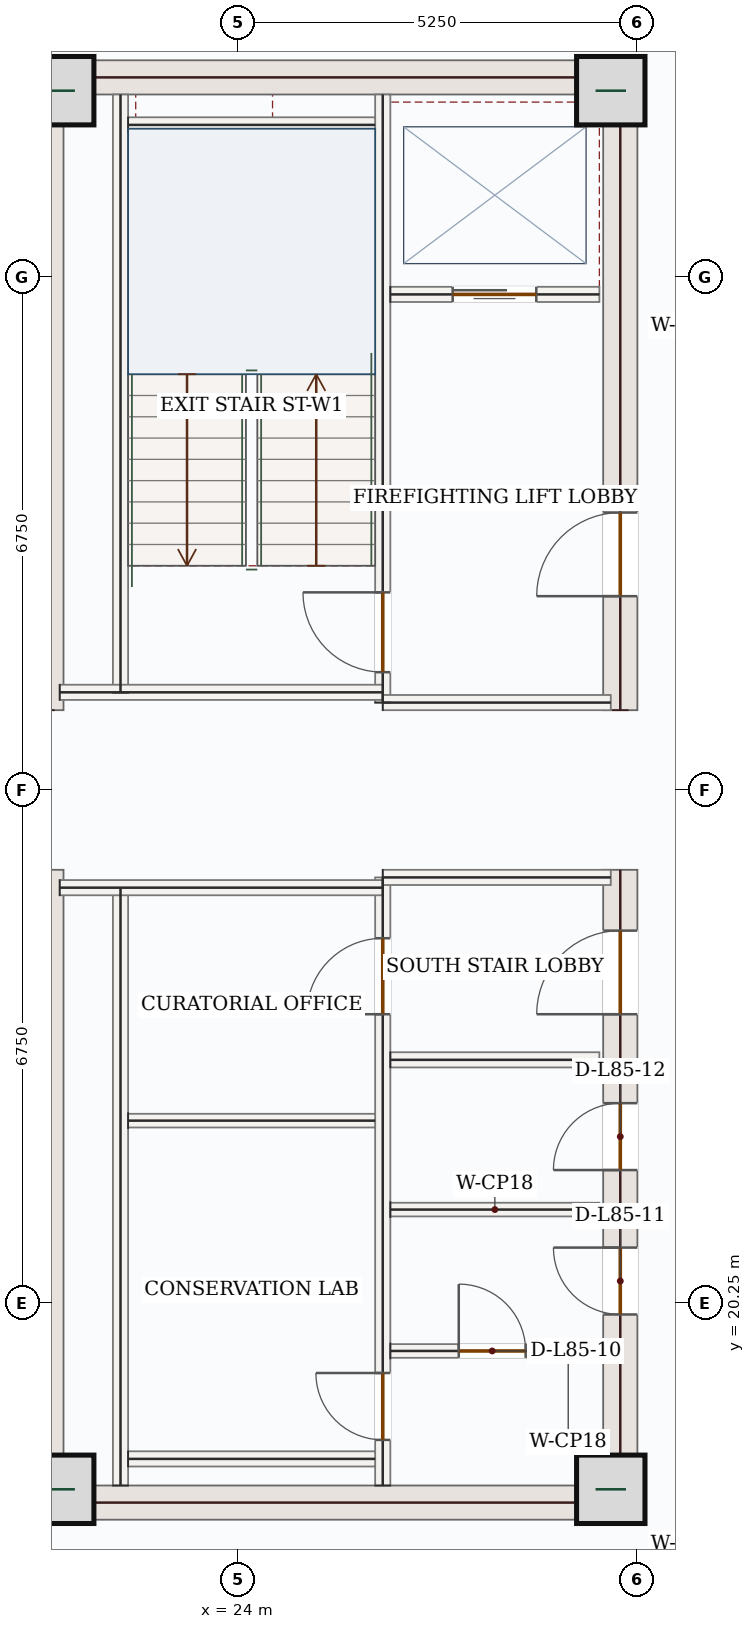
"""IFC4 building model, lengths in metres.
Left out: names, types, materials, properties, quantities, classifications, styles, units other than length and angle.
Written with IfcOpenShell. Run it as: python <this file> out.ifc"""

import sys

from ifc_helpers import new_model, si_unit, direction, frame, frame_2d, origin, origin_2d, place, context, subcontext, project, spatial, rectangle, extrude, source, transform, mapped, element, fill, save


model = new_model("IFC4")
c1 = context("Model", 3, precision=1e-05, world=origin(), true_north=direction((0.0, 1.0)))
c2 = subcontext(c1, "Body", "Model", "MODEL_VIEW")
j1 = project(units=[si_unit("LENGTHUNIT", "METRE"), si_unit("PLANEANGLEUNIT", "RADIAN")], contexts=[c1])
p1 = place(None, origin())
s1 = spatial("IfcSite", under=j1, at=p1, CompositionType="ELEMENT")
p2 = place(p1, origin())
s2 = spatial("IfcBuilding", under=s1, at=p2, CompositionType="ELEMENT")
p3 = place(p2, frame((0.0, 0.0, 349.8)))
s3 = spatial("IfcBuildingStorey", under=s2, at=p3, CompositionType="ELEMENT", Elevation=349.8)
m1 = source(origin(), c2, "Body", "SweptSolid", [
    extrude(rectangle(XDim=8.55, YDim=0.45, at=frame_2d((4.275, 0.0))), origin(), (0.0, 0.0, 1.0), 3.5),
])
for number, where, z_axis, x_axis in (
    (1, (21.475, 17.4, 0.0), (0.0, 0.0, 1.0), (0.0, 1.0, 0.0)),
    (2, (21.475, 28.05, 0.0), (0.0, 0.0, 1.0), (0.0, 1.0, 0.0)),
):
    element("IfcWall", number, at=place(p3, frame(where, z_axis=z_axis, x_axis=x_axis)), inside=s3, PredefinedType="SHEAR", context=c2, shape_type="MappedRepresentation", body=[
        mapped(m1, transform((0.0, 0.0, 0.0), x_axis=(1.0, 0.0, 0.0), y_axis=(0.0, 1.0, 0.0), z_axis=(0.0, 0.0, 1.0), scale=1.0)),
    ])
p4 = place(p3, frame((29.025, 17.4, 0.0), z_axis=(0.0, 0.0, 1.0), x_axis=(0.0, 1.0, 0.0)))
e3 = element("IfcWall", 3, at=p4, inside=s3, PredefinedType="SHEAR", context=c2, shape_type="SweptSolid", body=[
    extrude(rectangle(XDim=8.55, YDim=0.45, at=frame_2d((4.275, 0.0))), origin(), (0.0, 0.0, 1.0), 3.5),
])
p5 = place(p4, frame((6.65, 0.0, 0.0)))
e4 = element("IfcOpeningElement", 4, at=p5, cuts=e3, PredefinedType="OPENING", context=c2, shape_type="SweptSolid", body=[
    extrude(rectangle(XDim=1.1, YDim=2.2, at=frame_2d((0.55, 1.1))), frame((0.0, 0.235, 0.0), z_axis=(0.0, -1.0, 0.0), x_axis=(1.0, 0.0, 0.0)), (0.0, 0.0, 1.0), 0.47),
])
p6 = place(p4, frame((2.7, 0.0, 0.0)))
e5 = element("IfcOpeningElement", 5, at=p6, cuts=e3, PredefinedType="OPENING", context=c2, shape_type="SweptSolid", body=[
    extrude(rectangle(XDim=0.88, YDim=2.1, at=frame_2d((0.44, 1.05))), frame((0.0, 0.235, 0.0), z_axis=(0.0, -1.0, 0.0), x_axis=(1.0, 0.0, 0.0)), (0.0, 0.0, 1.0), 0.47),
])
p7 = place(p4, frame((4.6, 0.0, 0.0)))
e6 = element("IfcOpeningElement", 6, at=p7, cuts=e3, PredefinedType="OPENING", context=c2, shape_type="SweptSolid", body=[
    extrude(rectangle(XDim=0.88, YDim=2.1, at=frame_2d((0.44, 1.05))), frame((0.0, 0.235, 0.0), z_axis=(0.0, -1.0, 0.0), x_axis=(1.0, 0.0, 0.0)), (0.0, 0.0, 1.0), 0.47),
])
p8 = place(p3, frame((29.025, 28.05, 0.0), z_axis=(0.0, 0.0, 1.0), x_axis=(0.0, 1.0, 0.0)))
e7 = element("IfcWall", 7, at=p8, inside=s3, PredefinedType="SHEAR", context=c2, shape_type="SweptSolid", body=[
    extrude(rectangle(XDim=8.55, YDim=0.45, at=frame_2d((4.275, 0.0))), origin(), (0.0, 0.0, 1.0), 3.5),
])
p9 = place(p8, frame((1.5, 0.0, 0.0)))
e8 = element("IfcOpeningElement", 8, at=p9, cuts=e7, PredefinedType="OPENING", context=c2, shape_type="SweptSolid", body=[
    extrude(rectangle(XDim=1.1, YDim=2.2, at=frame_2d((0.55, 1.1))), frame((0.0, 0.235, 0.0), z_axis=(0.0, -1.0, 0.0), x_axis=(1.0, 0.0, 0.0)), (0.0, 0.0, 1.0), 0.47),
])
m2 = source(origin(), c2, "Body", "SweptSolid", [
    extrude(rectangle(XDim=7.1, YDim=0.45, at=frame_2d((3.55, 0.0))), origin(), (0.0, 0.0, 1.0), 3.5),
])
for number, where, z_axis, x_axis in (
    (9, (21.7, 17.625, 0.0), (0.0, 0.0, 1.0), (1.0, 0.0, 0.0)),
    (10, (21.7, 36.375, 0.0), (0.0, 0.0, 1.0), (1.0, 0.0, 0.0)),
):
    element("IfcWall", number, at=place(p3, frame(where, z_axis=z_axis, x_axis=x_axis)), inside=s3, PredefinedType="SHEAR", context=c2, shape_type="MappedRepresentation", body=[
        mapped(m2, transform((0.0, 0.0, 0.0), x_axis=(1.0, 0.0, 0.0), y_axis=(0.0, 1.0, 0.0), z_axis=(0.0, 0.0, 1.0), scale=1.0)),
    ])
m3 = source(origin(), c2, "Body", "SweptSolid", [
    extrude(rectangle(XDim=0.9, YDim=0.9, at=origin_2d()), origin(), (0.0, 0.0, 1.0), 3.75),
])
for number, where, z_axis, x_axis in (
    (11, (21.65, 17.8, 0.0), (0.0, 0.0, 1.0), (1.0, 0.0, 0.0)),
    (12, (28.9, 17.8, 0.0), (0.0, 0.0, 1.0), (1.0, 0.0, 0.0)),
    (13, (21.65, 36.2, 0.0), (0.0, 0.0, 1.0), (1.0, 0.0, 0.0)),
    (14, (28.9, 36.2, 0.0), (0.0, 0.0, 1.0), (1.0, 0.0, 0.0)),
):
    element("IfcColumn", number, at=place(p3, frame(where, z_axis=z_axis, x_axis=x_axis)), inside=s3, PredefinedType="COLUMN", context=c2, shape_type="MappedRepresentation", body=[
        mapped(m3, transform((0.0, 0.0, 0.0), x_axis=(1.0, 0.0, 0.0), y_axis=(0.0, 1.0, 0.0), z_axis=(0.0, 0.0, 1.0), scale=1.0)),
    ])
p10 = place(p3, frame((22.167, 14.994, 0.0), z_axis=(0.0, 0.0, 1.0), x_axis=(-0.681733754317, 0.731600361006, 0.0)))
e15 = element("IfcWall", 15, at=p10, inside=s3, PredefinedType="SOLIDWALL", context=c2, shape_type="SweptSolid", body=[
    extrude(rectangle(XDim=4.734, YDim=0.28, at=frame_2d((2.367, 0.0))), origin(), (0.0, 0.0, 1.0), 3.5),
])
p11 = place(p10, frame((1.617, 0.0, 0.85)))
e16 = element("IfcOpeningElement", 16, at=p11, cuts=e15, PredefinedType="OPENING", context=c2, shape_type="SweptSolid", body=[
    extrude(rectangle(XDim=1.5, YDim=1.5, at=frame_2d((0.75, 0.75))), frame((0.0, 0.15, 0.0), z_axis=(0.0, -1.0, 0.0), x_axis=(1.0, 0.0, 0.0)), (0.0, 0.0, 1.0), 0.3),
])
m4 = source(origin(), c2, "Body", "SweptSolid", [
    extrude(rectangle(XDim=7.87, YDim=0.2, at=frame_2d((3.935, 0.0))), origin(), (0.0, 0.0, 1.0), 3.5),
])
for number, where, z_axis, x_axis in (
    (17, (22.45, 17.85, 0.0), (0.0, 0.0, 1.0), (0.0, 1.0, 0.0)),
    (18, (22.45, 28.28, 0.0), (0.0, 0.0, 1.0), (0.0, 1.0, 0.0)),
):
    element("IfcWall", number, at=place(p3, frame(where, z_axis=z_axis, x_axis=x_axis)), inside=s3, PredefinedType="SOLIDWALL", context=c2, shape_type="MappedRepresentation", body=[
        mapped(m4, transform((0.0, 0.0, 0.0), x_axis=(1.0, 0.0, 0.0), y_axis=(0.0, 1.0, 0.0), z_axis=(0.0, 0.0, 1.0), scale=1.0)),
    ])
p12 = place(p3, frame((25.9, 17.85, 0.0), z_axis=(0.0, 0.0, 1.0), x_axis=(0.0, 1.0, 0.0)))
e19 = element("IfcWall", 19, at=p12, inside=s3, PredefinedType="SOLIDWALL", context=c2, shape_type="SweptSolid", body=[
    extrude(rectangle(XDim=8.0, YDim=0.2, at=frame_2d((4.0, 0.0))), origin(), (0.0, 0.0, 1.0), 3.5),
])
p13 = place(p12, frame((6.2, 0.0, 0.0)))
e20 = element("IfcOpeningElement", 20, at=p13, cuts=e19, PredefinedType="OPENING", context=c2, shape_type="SweptSolid", body=[
    extrude(rectangle(XDim=1.0, YDim=2.15, at=frame_2d((0.5, 1.075))), frame((0.0, 0.11, 0.0), z_axis=(0.0, -1.0, 0.0), x_axis=(1.0, 0.0, 0.0)), (0.0, 0.0, 1.0), 0.22),
])
p14 = place(p12, frame((0.6, 0.0, 0.0)))
e21 = element("IfcOpeningElement", 21, at=p14, cuts=e19, PredefinedType="OPENING", context=c2, shape_type="SweptSolid", body=[
    extrude(rectangle(XDim=0.88, YDim=2.1, at=frame_2d((0.44, 1.05))), frame((0.0, 0.11, 0.0), z_axis=(0.0, -1.0, 0.0), x_axis=(1.0, 0.0, 0.0)), (0.0, 0.0, 1.0), 0.22),
])
p15 = place(p3, frame((25.9, 28.15, 0.0), z_axis=(0.0, 0.0, 1.0), x_axis=(0.0, 1.0, 0.0)))
e22 = element("IfcWall", 22, at=p15, inside=s3, PredefinedType="SOLIDWALL", context=c2, shape_type="SweptSolid", body=[
    extrude(rectangle(XDim=8.0, YDim=0.2, at=frame_2d((4.0, 0.0))), origin(), (0.0, 0.0, 1.0), 3.5),
])
p16 = place(p15, frame((0.4, 0.0, 0.0)))
e23 = element("IfcOpeningElement", 23, at=p16, cuts=e22, PredefinedType="OPENING", context=c2, shape_type="SweptSolid", body=[
    extrude(rectangle(XDim=1.05, YDim=2.15, at=frame_2d((0.525, 1.075))), frame((0.0, 0.11, 0.0), z_axis=(0.0, -1.0, 0.0), x_axis=(1.0, 0.0, 0.0)), (0.0, 0.0, 1.0), 0.22),
])
m5 = source(origin(), c2, "Body", "SweptSolid", [
    extrude(rectangle(XDim=4.25, YDim=0.2, at=frame_2d((2.125, 0.0))), origin(), (0.0, 0.0, 1.0), 3.5),
])
p17 = place(p3, frame((21.65, 25.715, 0.0), z_axis=(0.0, 0.0, 1.0), x_axis=(1.0, 0.0, 0.0)))
e24 = element("IfcWall", 24, at=p17, inside=s3, PredefinedType="SOLIDWALL", context=c2, shape_type="MappedRepresentation", body=[
    mapped(m5, transform((0.0, 0.0, 0.0), x_axis=(1.0, 0.0, 0.0), y_axis=(0.0, 1.0, 0.0), z_axis=(0.0, 0.0, 1.0), scale=1.0)),
])
m6 = source(origin(), c2, "Body", "SweptSolid", [
    extrude(rectangle(XDim=3.0, YDim=0.2, at=frame_2d((1.5, 0.0))), origin(), (0.0, 0.0, 1.0), 3.5),
])
p18 = place(p3, frame((25.9, 25.85, 0.0), z_axis=(0.0, 0.0, 1.0), x_axis=(1.0, 0.0, 0.0)))
e25 = element("IfcWall", 25, at=p18, inside=s3, PredefinedType="SOLIDWALL", context=c2, shape_type="MappedRepresentation", body=[
    mapped(m6, transform((0.0, 0.0, 0.0), x_axis=(1.0, 0.0, 0.0), y_axis=(0.0, 1.0, 0.0), z_axis=(0.0, 0.0, 1.0), scale=1.0)),
])
p19 = place(p3, frame((21.65, 28.285, 0.0), z_axis=(0.0, 0.0, 1.0), x_axis=(1.0, 0.0, 0.0)))
e26 = element("IfcWall", 26, at=p19, inside=s3, PredefinedType="SOLIDWALL", context=c2, shape_type="MappedRepresentation", body=[
    mapped(m5, transform((0.0, 0.0, 0.0), x_axis=(1.0, 0.0, 0.0), y_axis=(0.0, 1.0, 0.0), z_axis=(0.0, 0.0, 1.0), scale=1.0)),
])
p20 = place(p3, frame((25.9, 28.15, 0.0), z_axis=(0.0, 0.0, 1.0), x_axis=(1.0, 0.0, 0.0)))
e27 = element("IfcWall", 27, at=p20, inside=s3, PredefinedType="SOLIDWALL", context=c2, shape_type="MappedRepresentation", body=[
    mapped(m6, transform((0.0, 0.0, 0.0), x_axis=(1.0, 0.0, 0.0), y_axis=(0.0, 1.0, 0.0), z_axis=(0.0, 0.0, 1.0), scale=1.0)),
])
m7 = source(origin(), c2, "Body", "SweptSolid", [
    extrude(rectangle(XDim=3.25, YDim=0.2, at=frame_2d((1.625, 0.0))), origin(), (0.0, 0.0, 1.0), 3.5),
])
for number, where, z_axis, x_axis in (
    (28, (22.55, 35.75, 0.0), (0.0, 0.0, 1.0), (1.0, 0.0, 0.0)),
    (29, (22.55, 18.2, 0.0), (0.0, 0.0, 1.0), (1.0, 0.0, 0.0)),
):
    element("IfcWall", number, at=place(p3, frame(where, z_axis=z_axis, x_axis=x_axis)), inside=s3, PredefinedType="SOLIDWALL", context=c2, shape_type="MappedRepresentation", body=[
        mapped(m7, transform((0.0, 0.0, 0.0), x_axis=(1.0, 0.0, 0.0), y_axis=(0.0, 1.0, 0.0), z_axis=(0.0, 0.0, 1.0), scale=1.0)),
    ])
m8 = source(origin(), c2, "Body", "SweptSolid", [
    extrude(rectangle(XDim=3.25, YDim=0.18, at=frame_2d((1.625, 0.0))), origin(), (0.0, 0.0, 1.0), 3.5),
])
p21 = place(p3, frame((22.55, 22.65, 0.0), z_axis=(0.0, 0.0, 1.0), x_axis=(1.0, 0.0, 0.0)))
e30 = element("IfcWall", 30, at=p21, inside=s3, PredefinedType="PARTITIONING", context=c2, shape_type="MappedRepresentation", body=[
    mapped(m8, transform((0.0, 0.0, 0.0), x_axis=(1.0, 0.0, 0.0), y_axis=(0.0, 1.0, 0.0), z_axis=(0.0, 0.0, 1.0), scale=1.0)),
])
p22 = place(p3, frame((26.0, 33.52, 0.0), z_axis=(0.0, 0.0, 1.0), x_axis=(1.0, 0.0, 0.0)))
e31 = element("IfcWall", 31, at=p22, inside=s3, PredefinedType="SOLIDWALL", context=c2, shape_type="SweptSolid", body=[
    extrude(rectangle(XDim=2.75, YDim=0.2, at=frame_2d((1.375, 0.0))), origin(), (0.0, 0.0, 1.0), 3.5),
])
p23 = place(p22, frame((0.82, 0.0, 0.0)))
e32 = element("IfcOpeningElement", 32, at=p23, cuts=e31, PredefinedType="OPENING", context=c2, shape_type="SweptSolid", body=[
    extrude(rectangle(XDim=1.1, YDim=2.15, at=frame_2d((0.55, 1.075))), frame((0.0, 0.11, 0.0), z_axis=(0.0, -1.0, 0.0), x_axis=(1.0, 0.0, 0.0)), (0.0, 0.0, 1.0), 0.22),
])
m9 = source(origin(), c2, "Body", "SweptSolid", [
    extrude(rectangle(XDim=2.75, YDim=0.2, at=frame_2d((1.375, 0.0))), origin(), (0.0, 0.0, 1.0), 3.5),
])
p24 = place(p3, frame((26.0, 23.45, 0.0), z_axis=(0.0, 0.0, 1.0), x_axis=(1.0, 0.0, 0.0)))
e33 = element("IfcWall", 33, at=p24, inside=s3, PredefinedType="SOLIDWALL", context=c2, shape_type="MappedRepresentation", body=[
    mapped(m9, transform((0.0, 0.0, 0.0), x_axis=(1.0, 0.0, 0.0), y_axis=(0.0, 1.0, 0.0), z_axis=(0.0, 0.0, 1.0), scale=1.0)),
])
p25 = place(p3, frame((26.0, 19.62, 0.0), z_axis=(0.0, 0.0, 1.0), x_axis=(1.0, 0.0, 0.0)))
e34 = element("IfcWall", 34, at=p25, inside=s3, PredefinedType="PARTITIONING", context=c2, shape_type="SweptSolid", body=[
    extrude(rectangle(XDim=2.75, YDim=0.18, at=frame_2d((1.375, 0.0))), origin(), (0.0, 0.0, 1.0), 3.5),
])
p26 = place(p25, frame((0.9, 0.0, 0.0)))
e35 = element("IfcOpeningElement", 35, at=p26, cuts=e34, PredefinedType="OPENING", context=c2, shape_type="SweptSolid", body=[
    extrude(rectangle(XDim=0.88, YDim=2.1, at=frame_2d((0.44, 1.05))), frame((0.0, 0.1, 0.0), z_axis=(0.0, -1.0, 0.0), x_axis=(1.0, 0.0, 0.0)), (0.0, 0.0, 1.0), 0.2),
])
m10 = source(origin(), c2, "Body", "SweptSolid", [
    extrude(rectangle(XDim=2.75, YDim=0.18, at=frame_2d((1.375, 0.0))), origin(), (0.0, 0.0, 1.0), 3.5),
])
p27 = place(p3, frame((26.0, 21.48, 0.0), z_axis=(0.0, 0.0, 1.0), x_axis=(1.0, 0.0, 0.0)))
e36 = element("IfcWall", 36, at=p27, inside=s3, PredefinedType="PARTITIONING", context=c2, shape_type="MappedRepresentation", body=[
    mapped(m10, transform((0.0, 0.0, 0.0), x_axis=(1.0, 0.0, 0.0), y_axis=(0.0, 1.0, 0.0), z_axis=(0.0, 0.0, 1.0), scale=1.0)),
])
m11 = source(origin(), c2, "Body", "SweptSolid", [
    extrude(rectangle(XDim=1.05, YDim=2.15, at=frame_2d((0.525, 1.075))), frame((0.0, 0.025, 0.0), z_axis=(0.0, -1.0, 0.0), x_axis=(1.0, 0.0, 0.0)), (0.0, 0.0, 1.0), 0.05),
])
p28 = place(p16, origin())
e37 = element("IfcDoor", 37, at=p28, inside=s3, OperationType="SINGLE_SWING_RIGHT", PredefinedType="DOOR", context=c2, shape_type="MappedRepresentation", body=[
    mapped(m11, transform((0.0, 0.0, 0.0), x_axis=(1.0, 0.0, 0.0), y_axis=(0.0, 1.0, 0.0), z_axis=(0.0, 0.0, 1.0), scale=1.0)),
])
fill(e23, e37)
m12 = source(origin(), c2, "Body", "SweptSolid", [
    extrude(rectangle(XDim=1.0, YDim=2.15, at=frame_2d((0.5, 1.075))), frame((0.0, 0.025, 0.0), z_axis=(0.0, -1.0, 0.0), x_axis=(1.0, 0.0, 0.0)), (0.0, 0.0, 1.0), 0.05),
])
p29 = place(p13, origin())
e38 = element("IfcDoor", 38, at=p29, inside=s3, OperationType="SINGLE_SWING_LEFT", PredefinedType="DOOR", context=c2, shape_type="MappedRepresentation", body=[
    mapped(m12, transform((0.0, 0.0, 0.0), x_axis=(1.0, 0.0, 0.0), y_axis=(0.0, 1.0, 0.0), z_axis=(0.0, 0.0, 1.0), scale=1.0)),
])
fill(e20, e38)
m13 = source(origin(), c2, "Body", "SweptSolid", [
    extrude(rectangle(XDim=0.88, YDim=2.1, at=frame_2d((0.44, 1.05))), frame((0.0, 0.025, 0.0), z_axis=(0.0, -1.0, 0.0), x_axis=(1.0, 0.0, 0.0)), (0.0, 0.0, 1.0), 0.05),
])
p30 = place(p14, origin())
e39 = element("IfcDoor", 39, at=p30, inside=s3, OperationType="SINGLE_SWING_RIGHT", PredefinedType="DOOR", context=c2, shape_type="MappedRepresentation", body=[
    mapped(m13, transform((0.0, 0.0, 0.0), x_axis=(1.0, 0.0, 0.0), y_axis=(0.0, 1.0, 0.0), z_axis=(0.0, 0.0, 1.0), scale=1.0)),
])
fill(e21, e39)
m14 = source(origin(), c2, "Body", "SweptSolid", [
    extrude(rectangle(XDim=1.1, YDim=2.15, at=frame_2d((0.55, 1.075))), frame((0.0, 0.025, 0.0), z_axis=(0.0, -1.0, 0.0), x_axis=(1.0, 0.0, 0.0)), (0.0, 0.0, 1.0), 0.05),
])
p31 = place(p23, origin())
e40 = element("IfcDoor", 40, at=p31, inside=s3, OperationType="DOUBLE_DOOR_SLIDING", PredefinedType="DOOR", context=c2, shape_type="MappedRepresentation", body=[
    mapped(m14, transform((0.0, 0.0, 0.0), x_axis=(1.0, 0.0, 0.0), y_axis=(0.0, 1.0, 0.0), z_axis=(0.0, 0.0, 1.0), scale=1.0)),
])
fill(e32, e40)
m15 = source(origin(), c2, "Body", "SweptSolid", [
    extrude(rectangle(XDim=1.1, YDim=2.2, at=frame_2d((0.55, 1.1))), frame((0.0, 0.025, 0.0), z_axis=(0.0, -1.0, 0.0), x_axis=(1.0, 0.0, 0.0)), (0.0, 0.0, 1.0), 0.05),
])
p32 = place(p9, origin())
e41 = element("IfcDoor", 41, at=p32, inside=s3, OperationType="SINGLE_SWING_LEFT", PredefinedType="DOOR", context=c2, shape_type="MappedRepresentation", body=[
    mapped(m15, transform((0.0, 0.0, 0.0), x_axis=(1.0, 0.0, 0.0), y_axis=(0.0, 1.0, 0.0), z_axis=(0.0, 0.0, 1.0), scale=1.0)),
])
fill(e8, e41)
p33 = place(p5, origin())
e42 = element("IfcDoor", 42, at=p33, inside=s3, OperationType="SINGLE_SWING_LEFT", PredefinedType="DOOR", context=c2, shape_type="MappedRepresentation", body=[
    mapped(m15, transform((0.0, 0.0, 0.0), x_axis=(1.0, 0.0, 0.0), y_axis=(0.0, 1.0, 0.0), z_axis=(0.0, 0.0, 1.0), scale=1.0)),
])
fill(e4, e42)
p34 = place(p26, origin())
e43 = element("IfcDoor", 43, at=p34, inside=s3, OperationType="SINGLE_SWING_LEFT", PredefinedType="DOOR", context=c2, shape_type="MappedRepresentation", body=[
    mapped(m13, transform((0.0, 0.0, 0.0), x_axis=(1.0, 0.0, 0.0), y_axis=(0.0, 1.0, 0.0), z_axis=(0.0, 0.0, 1.0), scale=1.0)),
])
fill(e35, e43)
p35 = place(p6, origin())
e44 = element("IfcDoor", 44, at=p35, inside=s3, OperationType="SINGLE_SWING_RIGHT", PredefinedType="DOOR", context=c2, shape_type="MappedRepresentation", body=[
    mapped(m13, transform((0.0, 0.0, 0.0), x_axis=(1.0, 0.0, 0.0), y_axis=(0.0, 1.0, 0.0), z_axis=(0.0, 0.0, 1.0), scale=1.0)),
])
fill(e5, e44)
p36 = place(p7, origin())
e45 = element("IfcDoor", 45, at=p36, inside=s3, OperationType="SINGLE_SWING_LEFT", PredefinedType="DOOR", context=c2, shape_type="MappedRepresentation", body=[
    mapped(m13, transform((0.0, 0.0, 0.0), x_axis=(1.0, 0.0, 0.0), y_axis=(0.0, 1.0, 0.0), z_axis=(0.0, 0.0, 1.0), scale=1.0)),
])
fill(e6, e45)
save(model, sys.argv[1])
